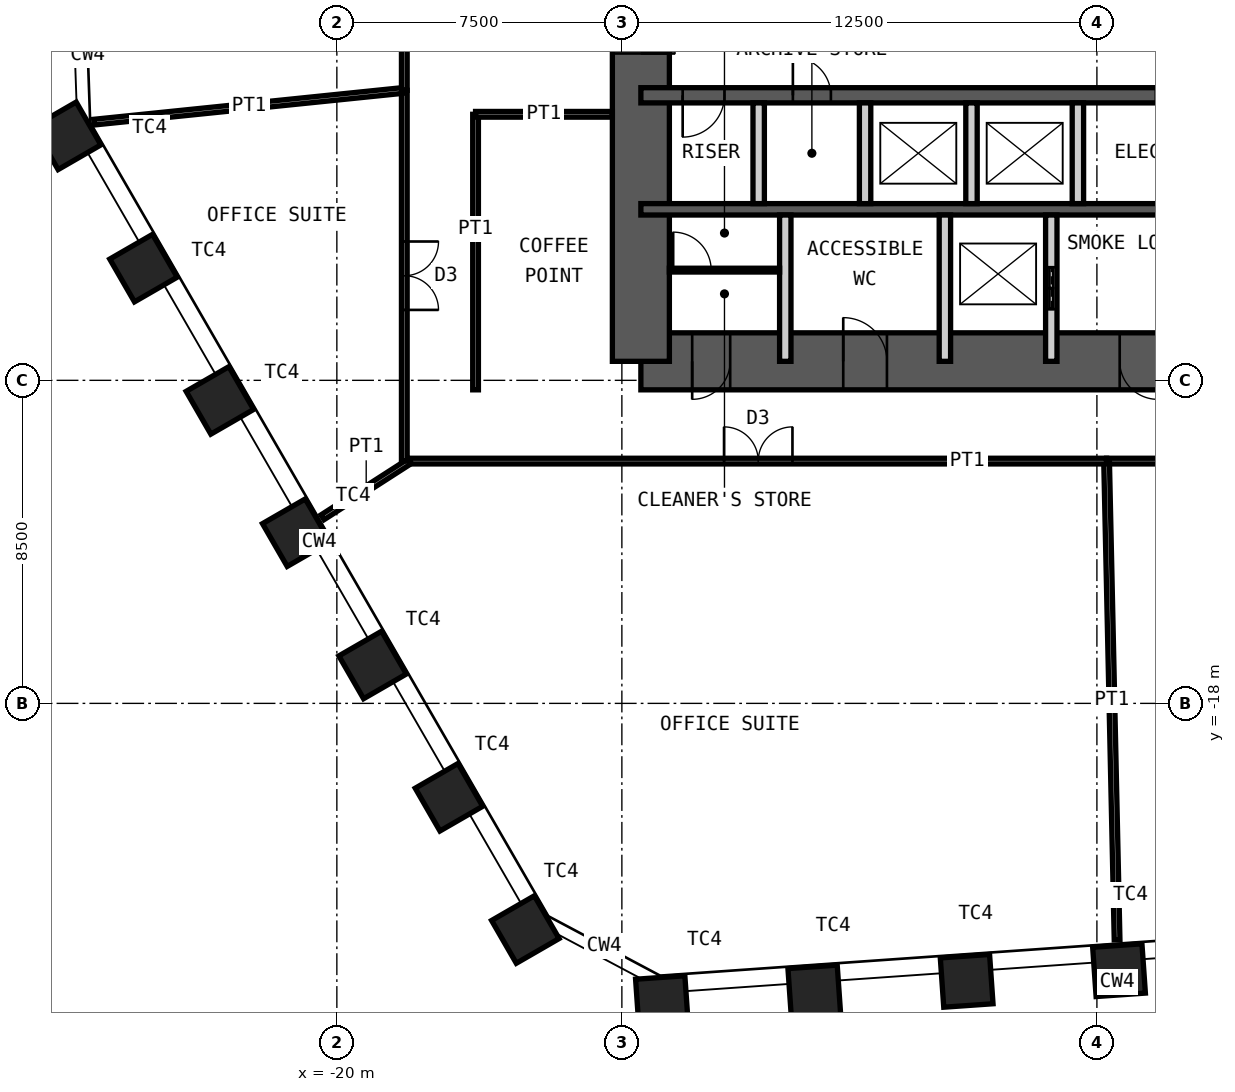
"""IFC4 building model, lengths in metres.
Left out: names, types, materials, properties, quantities, classifications, styles, units other than length and angle.
Written with IfcOpenShell. Run it as: python <this file> out.ifc"""

import sys

from ifc_helpers import new_model, si_unit, direction, frame, frame_2d, origin, origin_2d, place, context, subcontext, project, spatial, rectangle, hollow_rectangle, extrude, element, fill, save


model = new_model("IFC4")
c1 = context("Model", 3, precision=1e-05, world=origin(), true_north=direction((0.0, 1.0)))
c2 = subcontext(c1, "Body", "Model", "MODEL_VIEW")
j1 = project(units=[si_unit("LENGTHUNIT", "METRE"), si_unit("PLANEANGLEUNIT", "RADIAN")], contexts=[c1])
p1 = place(None, origin())
s1 = spatial("IfcSite", under=j1, at=p1, CompositionType="ELEMENT")
p2 = place(p1, origin())
s2 = spatial("IfcBuilding", under=s1, at=p2, CompositionType="ELEMENT")
p3 = place(p2, frame((0.0, 0.0, 145.0)))
s3 = spatial("IfcBuildingStorey", under=s2, at=p3, CompositionType="ELEMENT", Elevation=145.0)
for number, where, z_axis, x_axis in (
    (1, (0.582, -25.02, 0.0), (0.0, 0.0, 1.0), (0.998, 0.07, 0.0)),
    (2, (-3.427, -25.301, 0.0), (0.0, 0.0, 1.0), (0.998, 0.07, 0.0)),
    (3, (-7.436, -25.581, 0.0), (0.0, 0.0, 1.0), (0.998, 0.07, 0.0)),
    (4, (-11.446, -25.861, 0.0), (0.0, 0.0, 1.0), (0.998, 0.07, 0.0)),
    (5, (-15.04, -23.95, 0.0), (0.0, 0.0, 1.0), (0.5, -0.866, 0.0)),
    (6, (-17.049, -20.47, 0.0), (0.0, 0.0, 1.0), (0.5, -0.866, 0.0)),
    (7, (-19.059, -16.989, 0.0), (0.0, 0.0, 1.0), (0.5, -0.866, 0.0)),
    (8, (-21.068, -13.509, 0.0), (0.0, 0.0, 1.0), (0.5, -0.866, 0.0)),
    (9, (-23.078, -10.028, 0.0), (0.0, 0.0, 1.0), (0.5, -0.866, 0.0)),
    (10, (-25.087, -6.547, 0.0), (0.0, 0.0, 1.0), (0.5, -0.866, 0.0)),
    (11, (-27.097, -3.067, 0.0), (0.0, 0.0, 1.0), (0.5, -0.866, 0.0)),
):
    element("IfcColumn", number, at=place(p3, frame(where, z_axis=z_axis, x_axis=x_axis)), inside=s3, PredefinedType="COLUMN", context=c2, shape_type="SweptSolid", body=[
        extrude(hollow_rectangle(XDim=1.3, YDim=1.3, WallThickness=0.1, at=origin_2d()), origin(), (0.0, 0.0, 1.0), 4.2),
    ])
p4 = place(p3, frame((-12.0, -9.0, 0.0), z_axis=(0.0, 0.0, 1.0), x_axis=(1.0, 0.0, 0.0)))
e12 = element("IfcWall", 12, at=p4, inside=s3, PredefinedType="SHEAR", context=c2, shape_type="SweptSolid", body=[
    extrude(rectangle(XDim=24.0, YDim=1.5, at=frame_2d((12.0, 0.0))), origin(), (0.0, 0.0, 1.0), 4.2),
])
p5 = place(p4, frame((1.35, 0.0, 0.0)))
e13 = element("IfcOpeningElement", 13, at=p5, cuts=e12, PredefinedType="OPENING", context=c2, shape_type="SweptSolid", body=[
    extrude(rectangle(XDim=1.0, YDim=2.1, at=frame_2d((0.5, 1.05))), frame((0.0, 0.76, 0.0), z_axis=(0.0, -1.0, 0.0), x_axis=(1.0, 0.0, 0.0)), (0.0, 0.0, 1.0), 1.52),
])
p6 = place(p4, frame((5.325, 0.0, 0.0)))
e14 = element("IfcOpeningElement", 14, at=p6, cuts=e12, PredefinedType="OPENING", context=c2, shape_type="SweptSolid", body=[
    extrude(rectangle(XDim=1.15, YDim=2.1, at=frame_2d((0.575, 1.05))), frame((0.0, 0.76, 0.0), z_axis=(0.0, -1.0, 0.0), x_axis=(1.0, 0.0, 0.0)), (0.0, 0.0, 1.0), 1.52),
])
p7 = place(p4, frame((12.6, 0.0, 0.0)))
e15 = element("IfcOpeningElement", 15, at=p7, cuts=e12, PredefinedType="OPENING", context=c2, shape_type="SweptSolid", body=[
    extrude(rectangle(XDim=1.0, YDim=2.1, at=frame_2d((0.5, 1.05))), frame((0.0, 0.76, 0.0), z_axis=(0.0, -1.0, 0.0), x_axis=(1.0, 0.0, 0.0)), (0.0, 0.0, 1.0), 1.52),
])
p8 = place(p3, frame((-12.0, -9.0, 0.0), z_axis=(0.0, 0.0, 1.0), x_axis=(0.0, 1.0, 0.0)))
e16 = element("IfcWall", 16, at=p8, inside=s3, PredefinedType="SHEAR", context=c2, shape_type="SweptSolid", body=[
    extrude(rectangle(XDim=18.0, YDim=1.5, at=frame_2d((9.0, 0.0))), origin(), (0.0, 0.0, 1.0), 4.2),
])
p9 = place(p8, frame((8.1, 0.0, 0.0)))
e17 = element("IfcOpeningElement", 17, at=p9, cuts=e16, PredefinedType="OPENING", context=c2, shape_type="SweptSolid", body=[
    extrude(rectangle(XDim=1.8, YDim=2.1, at=frame_2d((0.9, 1.05))), frame((0.0, 0.76, 0.0), z_axis=(0.0, -1.0, 0.0), x_axis=(1.0, 0.0, 0.0)), (0.0, 0.0, 1.0), 1.52),
])
p10 = place(p3, frame((-12.0, -2.0, 0.0), z_axis=(0.0, 0.0, 1.0), x_axis=(1.0, 0.0, 0.0)))
e18 = element("IfcWall", 18, at=p10, inside=s3, PredefinedType="SHEAR", context=c2, shape_type="SweptSolid", body=[
    extrude(rectangle(XDim=24.0, YDim=0.4, at=frame_2d((12.0, 0.0))), origin(), (0.0, 0.0, 1.0), 4.2),
])
p11 = place(p10, frame((1.1, 0.0, 0.0)))
e19 = element("IfcOpeningElement", 19, at=p11, cuts=e18, PredefinedType="OPENING", context=c2, shape_type="SweptSolid", body=[
    extrude(rectangle(XDim=1.1, YDim=2.1, at=frame_2d((0.55, 1.05))), frame((0.0, 0.21, 0.0), z_axis=(0.0, -1.0, 0.0), x_axis=(1.0, 0.0, 0.0)), (0.0, 0.0, 1.0), 0.42),
])
p12 = place(p10, frame((13.55, 0.0, 0.0)))
e20 = element("IfcOpeningElement", 20, at=p12, cuts=e18, PredefinedType="OPENING", context=c2, shape_type="SweptSolid", body=[
    extrude(rectangle(XDim=1.1, YDim=2.1, at=frame_2d((0.55, 1.05))), frame((0.0, 0.21, 0.0), z_axis=(0.0, -1.0, 0.0), x_axis=(1.0, 0.0, 0.0)), (0.0, 0.0, 1.0), 0.42),
])
p13 = place(p10, frame((20.7, 0.0, 0.0)))
e21 = element("IfcOpeningElement", 21, at=p13, cuts=e18, PredefinedType="OPENING", context=c2, shape_type="SweptSolid", body=[
    extrude(rectangle(XDim=1.1, YDim=2.1, at=frame_2d((0.55, 1.05))), frame((0.0, 0.21, 0.0), z_axis=(0.0, -1.0, 0.0), x_axis=(1.0, 0.0, 0.0)), (0.0, 0.0, 1.0), 0.42),
])
p14 = place(p10, frame((4.0, 0.0, 0.0)))
e22 = element("IfcOpeningElement", 22, at=p14, cuts=e18, PredefinedType="OPENING", context=c2, shape_type="SweptSolid", body=[
    extrude(rectangle(XDim=1.0, YDim=2.1, at=frame_2d((0.5, 1.05))), frame((0.0, 0.21, 0.0), z_axis=(0.0, -1.0, 0.0), x_axis=(1.0, 0.0, 0.0)), (0.0, 0.0, 1.0), 0.42),
])
p15 = place(p3, frame((-12.0, -5.0, 0.0), z_axis=(0.0, 0.0, 1.0), x_axis=(1.0, 0.0, 0.0)))
e23 = element("IfcWall", 23, at=p15, inside=s3, PredefinedType="SHEAR", context=c2, shape_type="SweptSolid", body=[
    extrude(rectangle(XDim=24.0, YDim=0.3, at=frame_2d((12.0, 0.0))), origin(), (0.0, 0.0, 1.0), 4.2),
])
for number, where, z_axis, x_axis in (
    (24, (-8.9, -4.85, 0.0), (0.0, 0.0, 1.0), (0.0, 1.0, 0.0)),
    (25, (-6.1, -4.85, 0.0), (0.0, 0.0, 1.0), (0.0, 1.0, 0.0)),
    (26, (-3.3, -4.85, 0.0), (0.0, 0.0, 1.0), (0.0, 1.0, 0.0)),
    (27, (-0.5, -4.85, 0.0), (0.0, 0.0, 1.0), (0.0, 1.0, 0.0)),
):
    element("IfcWall", number, at=place(p3, frame(where, z_axis=z_axis, x_axis=x_axis)), inside=s3, PredefinedType="PARTITIONING", context=c2, shape_type="SweptSolid", body=[
        extrude(rectangle(XDim=2.65, YDim=0.3, at=frame_2d((1.325, 0.0))), origin(), (0.0, 0.0, 1.0), 3.98),
    ])
for number, where, z_axis, x_axis in (
    (28, (-8.2, -9.0, 0.0), (0.0, 0.0, 1.0), (0.0, 1.0, 0.0)),
    (29, (-4.0, -9.0, 0.0), (0.0, 0.0, 1.0), (0.0, 1.0, 0.0)),
):
    element("IfcWall", number, at=place(p3, frame(where, z_axis=z_axis, x_axis=x_axis)), inside=s3, PredefinedType="PARTITIONING", context=c2, shape_type="SweptSolid", body=[
        extrude(rectangle(XDim=3.85, YDim=0.3, at=frame_2d((1.925, 0.0))), origin(), (0.0, 0.0, 1.0), 3.98),
    ])
p16 = place(p3, frame((-1.2, -9.0, 0.0), z_axis=(0.0, 0.0, 1.0), x_axis=(0.0, 1.0, 0.0)))
e30 = element("IfcWall", 30, at=p16, inside=s3, PredefinedType="PARTITIONING", context=c2, shape_type="SweptSolid", body=[
    extrude(rectangle(XDim=3.85, YDim=0.3, at=frame_2d((1.925, 0.0))), origin(), (0.0, 0.0, 1.0), 3.98),
])
p17 = place(p16, frame((1.375, 0.0, 0.0)))
e31 = element("IfcOpeningElement", 31, at=p17, cuts=e30, PredefinedType="OPENING", context=c2, shape_type="SweptSolid", body=[
    extrude(rectangle(XDim=1.1, YDim=2.4, at=frame_2d((0.55, 1.2))), frame((0.0, 0.16, 0.0), z_axis=(0.0, -1.0, 0.0), x_axis=(1.0, 0.0, 0.0)), (0.0, 0.0, 1.0), 0.32),
])
p18 = place(p3, frame((-11.25, -6.6, 0.0), z_axis=(0.0, 0.0, 1.0), x_axis=(1.0, 0.0, 0.0)))
e32 = element("IfcWall", 32, at=p18, inside=s3, PredefinedType="PARTITIONING", context=c2, shape_type="SweptSolid", body=[
    extrude(rectangle(XDim=2.9, YDim=0.1, at=frame_2d((1.45, 0.0))), origin(), (0.0, 0.0, 1.0), 3.98),
])
p19 = place(p18, frame((0.1, 0.0, 0.0)))
e33 = element("IfcOpeningElement", 33, at=p19, cuts=e32, PredefinedType="OPENING", context=c2, shape_type="SweptSolid", body=[
    extrude(rectangle(XDim=1.0, YDim=2.4, at=frame_2d((0.5, 1.2))), frame((0.0, 0.06, 0.0), z_axis=(0.0, -1.0, 0.0), x_axis=(1.0, 0.0, 0.0)), (0.0, 0.0, 1.0), 0.12),
])
p20 = place(p3, frame((17.625, -11.625, 0.0), z_axis=(0.0, 0.0, 1.0), x_axis=(-1.0, 0.0, 0.0)))
e34 = element("IfcWall", 34, at=p20, inside=s3, PredefinedType="PARTITIONING", context=c2, shape_type="SweptSolid", body=[
    extrude(rectangle(XDim=17.37, YDim=0.15, at=frame_2d((8.685, 0.0))), origin(), (0.0, 0.0, 1.0), 4.03),
])
p21 = place(p20, frame((7.785, 0.0, 0.0)))
e35 = element("IfcOpeningElement", 35, at=p21, cuts=e34, PredefinedType="OPENING", context=c2, shape_type="SweptSolid", body=[
    extrude(rectangle(XDim=1.8, YDim=2.4, at=frame_2d((0.9, 1.2))), frame((0.0, 0.085, 0.0), z_axis=(0.0, -1.0, 0.0), x_axis=(1.0, 0.0, 0.0)), (0.0, 0.0, 1.0), 0.17),
])
p22 = place(p3, frame((0.531, -24.222, 0.0), z_axis=(0.0, 0.0, 1.0), x_axis=(-0.021933557026, 0.999759430601, 0.0)))
e36 = element("IfcWall", 36, at=p22, inside=s3, PredefinedType="PARTITIONING", context=c2, shape_type="SweptSolid", body=[
    extrude(rectangle(XDim=12.6, YDim=0.15, at=frame_2d((6.3, 0.0))), origin(), (0.0, 0.0, 1.0), 3.33),
])
p23 = place(p3, frame((0.255, -11.625, 0.0), z_axis=(0.0, 0.0, 1.0), x_axis=(-1.0, 0.0, 0.0)))
e37 = element("IfcWall", 37, at=p23, inside=s3, PredefinedType="PARTITIONING", context=c2, shape_type="SweptSolid", body=[
    extrude(rectangle(XDim=18.332, YDim=0.15, at=frame_2d((9.166, 0.0))), origin(), (0.0, 0.0, 1.0), 4.03),
])
p24 = place(p23, frame((8.266, 0.0, 0.0)))
e38 = element("IfcOpeningElement", 38, at=p24, cuts=e37, PredefinedType="OPENING", context=c2, shape_type="SweptSolid", body=[
    extrude(rectangle(XDim=1.8, YDim=2.4, at=frame_2d((0.9, 1.2))), frame((0.0, 0.085, 0.0), z_axis=(0.0, -1.0, 0.0), x_axis=(1.0, 0.0, 0.0)), (0.0, 0.0, 1.0), 0.17),
])
p25 = place(p3, frame((-20.378, -13.104, 0.0), z_axis=(0.0, 0.0, 1.0), x_axis=(0.841108871346, 0.540865848934, 0.0)))
e39 = element("IfcWall", 39, at=p25, inside=s3, PredefinedType="PARTITIONING", context=c2, shape_type="SweptSolid", body=[
    extrude(rectangle(XDim=2.735, YDim=0.15, at=frame_2d((1.368, 0.0))), origin(), (0.0, 0.0, 1.0), 3.33),
])
p26 = place(p3, frame((-18.225, -11.625, 0.0), z_axis=(0.0, 0.0, 1.0), x_axis=(0.0, 1.0, 0.0)))
e40 = element("IfcWall", 40, at=p26, inside=s3, PredefinedType="PARTITIONING", context=c2, shape_type="SweptSolid", body=[
    extrude(rectangle(XDim=9.756, YDim=0.15, at=frame_2d((4.878, 0.0))), origin(), (0.0, 0.0, 1.0), 4.03),
])
p27 = place(p26, frame((3.978, 0.0, 0.0)))
e41 = element("IfcOpeningElement", 41, at=p27, cuts=e40, PredefinedType="OPENING", context=c2, shape_type="SweptSolid", body=[
    extrude(rectangle(XDim=1.8, YDim=2.4, at=frame_2d((0.9, 1.2))), frame((0.0, 0.085, 0.0), z_axis=(0.0, -1.0, 0.0), x_axis=(1.0, 0.0, 0.0)), (0.0, 0.0, 1.0), 0.17),
])
p28 = place(p3, frame((-26.391, -2.706, 0.0), z_axis=(0.0, 0.0, 1.0), x_axis=(0.994783450774, 0.102009245004, 0.0)))
e42 = element("IfcWall", 42, at=p28, inside=s3, PredefinedType="PARTITIONING", context=c2, shape_type="SweptSolid", body=[
    extrude(rectangle(XDim=8.209, YDim=0.15, at=frame_2d((4.104, 0.0))), origin(), (0.0, 0.0, 1.0), 2.93),
])
p29 = place(p3, frame((-18.225, -1.869, 0.0), z_axis=(0.0, 0.0, 1.0), x_axis=(0.0, 1.0, 0.0)))
e43 = element("IfcWall", 43, at=p29, inside=s3, PredefinedType="PARTITIONING", context=c2, shape_type="SweptSolid", body=[
    extrude(rectangle(XDim=11.865, YDim=0.15, at=frame_2d((5.932, 0.0))), origin(), (0.0, 0.0, 1.0), 4.03),
])
p30 = place(p29, frame((5.032, 0.0, 0.0)))
e44 = element("IfcOpeningElement", 44, at=p30, cuts=e43, PredefinedType="OPENING", context=c2, shape_type="SweptSolid", body=[
    extrude(rectangle(XDim=1.8, YDim=2.4, at=frame_2d((0.9, 1.2))), frame((0.0, 0.085, 0.0), z_axis=(0.0, -1.0, 0.0), x_axis=(1.0, 0.0, 0.0)), (0.0, 0.0, 1.0), 0.17),
])
p31 = place(p3, frame((-16.35, -9.75, 0.0), z_axis=(0.0, 0.0, 1.0), x_axis=(0.0, 1.0, 0.0)))
e45 = element("IfcWall", 45, at=p31, inside=s3, PredefinedType="PARTITIONING", context=c2, shape_type="SweptSolid", body=[
    extrude(rectangle(XDim=7.25, YDim=0.15, at=frame_2d((3.625, 0.0))), origin(), (0.0, 0.0, 1.0), 4.03),
])
p32 = place(p3, frame((-12.75, -2.5, 0.0), z_axis=(0.0, 0.0, 1.0), x_axis=(-1.0, 0.0, 0.0)))
e46 = element("IfcWall", 46, at=p32, inside=s3, PredefinedType="PARTITIONING", context=c2, shape_type="SweptSolid", body=[
    extrude(rectangle(XDim=3.6, YDim=0.15, at=frame_2d((1.8, 0.0))), origin(), (0.0, 0.0, 1.0), 3.33),
])
p33 = place(p5, origin())
e47 = element("IfcDoor", 47, at=p33, inside=s3, OperationType="SINGLE_SWING_LEFT", PredefinedType="DOOR", context=c2, shape_type="SweptSolid", body=[
    extrude(rectangle(XDim=1.0, YDim=2.1, at=frame_2d((0.5, 1.05))), frame((0.0, 0.025, 0.0), z_axis=(0.0, -1.0, 0.0), x_axis=(1.0, 0.0, 0.0)), (0.0, 0.0, 1.0), 0.05),
])
fill(e13, e47)
p34 = place(p6, origin())
e48 = element("IfcDoor", 48, at=p34, inside=s3, OperationType="SINGLE_SWING_RIGHT", PredefinedType="DOOR", context=c2, shape_type="SweptSolid", body=[
    extrude(rectangle(XDim=1.15, YDim=2.1, at=frame_2d((0.575, 1.05))), frame((0.0, 0.025, 0.0), z_axis=(0.0, -1.0, 0.0), x_axis=(1.0, 0.0, 0.0)), (0.0, 0.0, 1.0), 0.05),
])
fill(e14, e48)
p35 = place(p7, origin())
e49 = element("IfcDoor", 49, at=p35, inside=s3, OperationType="SINGLE_SWING_RIGHT", PredefinedType="DOOR", context=c2, shape_type="SweptSolid", body=[
    extrude(rectangle(XDim=1.0, YDim=2.1, at=frame_2d((0.5, 1.05))), frame((0.0, 0.025, 0.0), z_axis=(0.0, -1.0, 0.0), x_axis=(1.0, 0.0, 0.0)), (0.0, 0.0, 1.0), 0.05),
])
fill(e15, e49)
p36 = place(p11, origin())
e50 = element("IfcDoor", 50, at=p36, inside=s3, OperationType="SINGLE_SWING_LEFT", PredefinedType="DOOR", context=c2, shape_type="SweptSolid", body=[
    extrude(rectangle(XDim=1.1, YDim=2.1, at=frame_2d((0.55, 1.05))), frame((0.0, 0.025, 0.0), z_axis=(0.0, -1.0, 0.0), x_axis=(1.0, 0.0, 0.0)), (0.0, 0.0, 1.0), 0.05),
])
fill(e19, e50)
p37 = place(p9, origin())
e51 = element("IfcDoor", 51, at=p37, inside=s3, OperationType="DOUBLE_DOOR_DOUBLE_SWING", PredefinedType="DOOR", context=c2, shape_type="SweptSolid", body=[
    extrude(rectangle(XDim=1.8, YDim=2.1, at=frame_2d((0.9, 1.05))), frame((0.0, 0.025, 0.0), z_axis=(0.0, -1.0, 0.0), x_axis=(1.0, 0.0, 0.0)), (0.0, 0.0, 1.0), 0.05),
])
fill(e17, e51)
p38 = place(p17, origin())
e52 = element("IfcDoor", 52, at=p38, inside=s3, OperationType="DOUBLE_DOOR_SLIDING", PredefinedType="DOOR", context=c2, shape_type="SweptSolid", body=[
    extrude(rectangle(XDim=1.1, YDim=2.4, at=frame_2d((0.55, 1.2))), frame((0.0, 0.025, 0.0), z_axis=(0.0, -1.0, 0.0), x_axis=(1.0, 0.0, 0.0)), (0.0, 0.0, 1.0), 0.05),
])
fill(e31, e52)
p39 = place(p14, origin())
e53 = element("IfcDoor", 53, at=p39, inside=s3, OperationType="SINGLE_SWING_RIGHT", PredefinedType="DOOR", context=c2, shape_type="SweptSolid", body=[
    extrude(rectangle(XDim=1.0, YDim=2.1, at=frame_2d((0.5, 1.05))), frame((0.0, 0.025, 0.0), z_axis=(0.0, -1.0, 0.0), x_axis=(1.0, 0.0, 0.0)), (0.0, 0.0, 1.0), 0.05),
])
fill(e22, e53)
p40 = place(p19, origin())
e54 = element("IfcDoor", 54, at=p40, inside=s3, OperationType="SINGLE_SWING_RIGHT", PredefinedType="DOOR", context=c2, shape_type="SweptSolid", body=[
    extrude(rectangle(XDim=1.0, YDim=2.4, at=frame_2d((0.5, 1.2))), frame((0.0, 0.025, 0.0), z_axis=(0.0, -1.0, 0.0), x_axis=(1.0, 0.0, 0.0)), (0.0, 0.0, 1.0), 0.05),
])
fill(e33, e54)
p41 = place(p24, origin())
e55 = element("IfcDoor", 55, at=p41, inside=s3, OperationType="DOUBLE_DOOR_DOUBLE_SWING", PredefinedType="DOOR", context=c2, shape_type="SweptSolid", body=[
    extrude(rectangle(XDim=1.8, YDim=2.4, at=frame_2d((0.9, 1.2))), frame((0.0, 0.025, 0.0), z_axis=(0.0, -1.0, 0.0), x_axis=(1.0, 0.0, 0.0)), (0.0, 0.0, 1.0), 0.05),
])
fill(e38, e55)
p42 = place(p27, origin())
e56 = element("IfcDoor", 56, at=p42, inside=s3, OperationType="DOUBLE_DOOR_DOUBLE_SWING", PredefinedType="DOOR", context=c2, shape_type="SweptSolid", body=[
    extrude(rectangle(XDim=1.8, YDim=2.4, at=frame_2d((0.9, 1.2))), frame((0.0, 0.025, 0.0), z_axis=(0.0, -1.0, 0.0), x_axis=(1.0, 0.0, 0.0)), (0.0, 0.0, 1.0), 0.05),
])
fill(e41, e56)
save(model, sys.argv[1])
